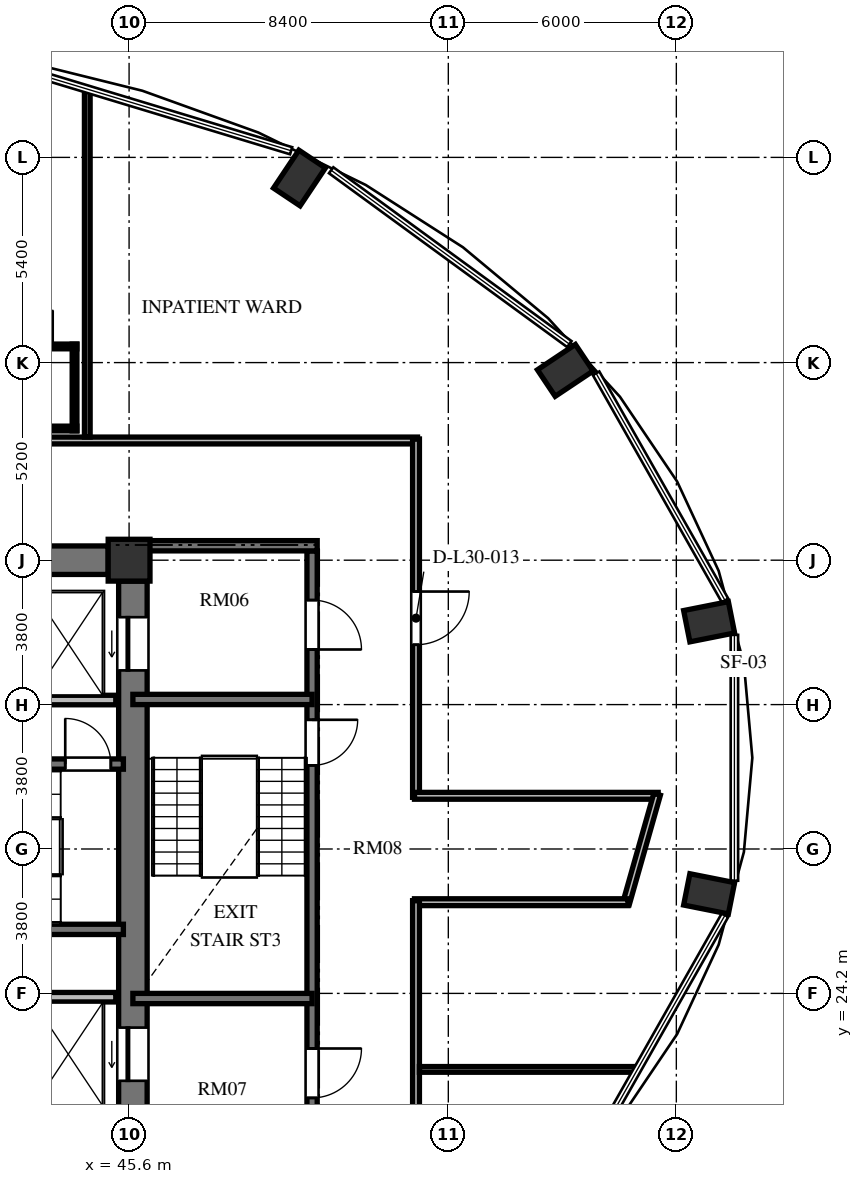
"""IFC4 building model, lengths in metres.
Left out: names, types, materials, properties, quantities, classifications, styles, units other than length and angle.
Written with IfcOpenShell. Run it as: python <this file> out.ifc"""

import sys

from ifc_helpers import new_model, si_unit, direction, frame, frame_2d, origin, origin_2d, place, context, subcontext, project, spatial, rectangle, extrude, element, fill, save


model = new_model("IFC4")
c1 = context("Model", 3, precision=1e-05, world=origin(), true_north=direction((0.0, 1.0)))
c2 = subcontext(c1, "Body", "Model", "MODEL_VIEW")
j1 = project(units=[si_unit("LENGTHUNIT", "METRE"), si_unit("PLANEANGLEUNIT", "RADIAN")], contexts=[c1])
p1 = place(None, origin())
s1 = spatial("IfcSite", under=j1, at=p1, CompositionType="ELEMENT")
p2 = place(p1, origin())
s2 = spatial("IfcBuilding", under=s1, at=p2, CompositionType="ELEMENT")
p3 = place(p2, frame((0.0, 0.0, 118.224)))
s3 = spatial("IfcBuildingStorey", under=s2, at=p3, CompositionType="ELEMENT", Elevation=118.224)
for number, where, z_axis, x_axis in (
    (1, (60.863, 26.82, 0.0), (0.0, 0.0, 1.0), (0.981, -0.195, 0.0)),
    (2, (60.863, 33.98, 0.0), (0.0, 0.0, 1.0), (0.981, 0.195, 0.0)),
    (3, (57.078, 40.595, 0.0), (0.0, 0.0, 1.0), (0.831, 0.556, 0.0)),
    (4, (50.084, 45.657, 0.0), (0.0, 0.0, 1.0), (0.556, 0.831, 0.0)),
):
    element("IfcColumn", number, at=place(p3, frame(where, z_axis=z_axis, x_axis=x_axis)), inside=s3, PredefinedType="COLUMN", context=c2, shape_type="SweptSolid", body=[
        extrude(rectangle(XDim=1.2, YDim=0.84, at=origin_2d()), origin(), (0.0, 0.0, 1.0), 3.648),
    ])
p4 = place(p3, frame((45.6, 35.6, 0.0), z_axis=(0.0, 0.0, 1.0), x_axis=(1.0, 0.0, 0.0)))
e5 = element("IfcColumn", 5, at=p4, inside=s3, PredefinedType="COLUMN", context=c2, shape_type="SweptSolid", body=[
    extrude(rectangle(XDim=1.1, YDim=1.1, at=origin_2d()), origin(), (0.0, 0.0, 1.0), 3.648),
])
p5 = place(p3, frame((45.7, 20.95, 0.0), z_axis=(0.0, 0.0, 1.0), x_axis=(0.0, 1.0, 0.0)))
e6 = element("IfcWall", 6, at=p5, inside=s3, PredefinedType="SHEAR", context=c2, shape_type="SweptSolid", body=[
    extrude(rectangle(XDim=14.1, YDim=0.75, at=frame_2d((7.05, 0.0))), origin(), (0.0, 0.0, 1.0), 3.648),
])
p6 = place(p5, frame((11.75, 0.0, 0.0)))
e7 = element("IfcOpeningElement", 7, at=p6, cuts=e6, PredefinedType="OPENING", context=c2, shape_type="SweptSolid", body=[
    extrude(rectangle(XDim=1.4, YDim=2.3, at=frame_2d((0.7, 1.15))), frame((0.0, 0.385, 0.0), z_axis=(0.0, -1.0, 0.0), x_axis=(1.0, 0.0, 0.0)), (0.0, 0.0, 1.0), 0.77),
])
p7 = place(p5, frame((0.95, 0.0, 0.0)))
e8 = element("IfcOpeningElement", 8, at=p7, cuts=e6, PredefinedType="OPENING", context=c2, shape_type="SweptSolid", body=[
    extrude(rectangle(XDim=1.4, YDim=2.3, at=frame_2d((0.7, 1.15))), frame((0.0, 0.385, 0.0), z_axis=(0.0, -1.0, 0.0), x_axis=(1.0, 0.0, 0.0)), (0.0, 0.0, 1.0), 0.77),
])
p8 = place(p3, frame((39.675, 35.6, 0.0), z_axis=(0.0, 0.0, 1.0), x_axis=(1.0, 0.0, 0.0)))
e9 = element("IfcWall", 9, at=p8, inside=s3, PredefinedType="SHEAR", context=c2, shape_type="SweptSolid", body=[
    extrude(rectangle(XDim=5.375, YDim=0.75, at=frame_2d((2.688, 0.0))), origin(), (0.0, 0.0, 1.0), 3.648),
])
p9 = place(p3, frame((37.465, 30.235, 0.0), z_axis=(0.0, 0.0, 1.0), x_axis=(1.0, 0.0, 0.0)))
e10 = element("IfcWall", 10, at=p9, inside=s3, PredefinedType="SHEAR", context=c2, shape_type="SweptSolid", body=[
    extrude(rectangle(XDim=7.985, YDim=0.27, at=frame_2d((3.992, 0.0))), origin(), (0.0, 0.0, 1.0), 3.648),
])
p10 = place(p9, frame((6.455, 0.0, 0.0)))
e11 = element("IfcOpeningElement", 11, at=p10, cuts=e10, PredefinedType="OPENING", context=c2, shape_type="SweptSolid", body=[
    extrude(rectangle(XDim=1.2, YDim=2.15, at=frame_2d((0.6, 1.075))), frame((0.0, 0.145, 0.0), z_axis=(0.0, -1.0, 0.0), x_axis=(1.0, 0.0, 0.0)), (0.0, 0.0, 1.0), 0.29),
])
p11 = place(p3, frame((37.465, 25.885, 0.0), z_axis=(0.0, 0.0, 1.0), x_axis=(1.0, 0.0, 0.0)))
e12 = element("IfcWall", 12, at=p11, inside=s3, PredefinedType="SHEAR", context=c2, shape_type="SweptSolid", body=[
    extrude(rectangle(XDim=7.985, YDim=0.27, at=frame_2d((3.992, 0.0))), origin(), (0.0, 0.0, 1.0), 3.648),
])
for number, where, z_axis, x_axis in (
    (13, (42.95, 31.92, 0.0), (0.0, 0.0, 1.0), (1.0, 0.0, 0.0)),
    (14, (42.95, 24.1, 0.0), (0.0, 0.0, 1.0), (1.0, 0.0, 0.0)),
):
    element("IfcWall", number, at=place(p3, frame(where, z_axis=z_axis, x_axis=x_axis)), inside=s3, PredefinedType="SOLIDWALL", context=c2, shape_type="SweptSolid", body=[
        extrude(rectangle(XDim=2.3, YDim=0.25, at=frame_2d((1.15, 0.0))), origin(), (0.0, 0.0, 1.0), 3.428),
    ])
p12 = place(p3, frame((50.415, 35.845, 0.0), z_axis=(0.0, 0.0, 1.0), x_axis=(0.0, -1.0, 0.0)))
e15 = element("IfcWall", 15, at=p12, inside=s3, PredefinedType="SHEAR", context=c2, shape_type="SweptSolid", body=[
    extrude(rectangle(XDim=15.825, YDim=0.27, at=frame_2d((7.913, 0.0))), origin(), (0.0, 0.0, 1.0), 3.648),
])
p13 = place(p12, frame((4.445, 0.0, 0.0)))
e16 = element("IfcOpeningElement", 16, at=p13, cuts=e15, PredefinedType="OPENING", context=c2, shape_type="SweptSolid", body=[
    extrude(rectangle(XDim=1.2, YDim=2.15, at=frame_2d((0.6, 1.075))), frame((0.0, 0.145, 0.0), z_axis=(0.0, -1.0, 0.0), x_axis=(1.0, 0.0, 0.0)), (0.0, 0.0, 1.0), 0.29),
])
p14 = place(p12, frame((1.295, 0.0, 0.0)))
e17 = element("IfcOpeningElement", 17, at=p14, cuts=e15, PredefinedType="OPENING", context=c2, shape_type="SweptSolid", body=[
    extrude(rectangle(XDim=1.3, YDim=2.2, at=frame_2d((0.65, 1.1))), frame((0.0, 0.145, 0.0), z_axis=(0.0, -1.0, 0.0), x_axis=(1.0, 0.0, 0.0)), (0.0, 0.0, 1.0), 0.29),
])
p15 = place(p12, frame((13.095, 0.0, 0.0)))
e18 = element("IfcOpeningElement", 18, at=p15, cuts=e15, PredefinedType="OPENING", context=c2, shape_type="SweptSolid", body=[
    extrude(rectangle(XDim=1.3, YDim=2.2, at=frame_2d((0.65, 1.1))), frame((0.0, 0.145, 0.0), z_axis=(0.0, -1.0, 0.0), x_axis=(1.0, 0.0, 0.0)), (0.0, 0.0, 1.0), 0.29),
])
p16 = place(p3, frame((46.075, 35.98, 0.0), z_axis=(0.0, 0.0, 1.0), x_axis=(1.0, 0.0, 0.0)))
e19 = element("IfcWall", 19, at=p16, inside=s3, PredefinedType="SHEAR", context=c2, shape_type="SweptSolid", body=[
    extrude(rectangle(XDim=4.475, YDim=0.27, at=frame_2d((2.238, 0.0))), origin(), (0.0, 0.0, 1.0), 3.648),
])
for number, where, z_axis, x_axis in (
    (20, (45.7, 31.935, 0.0), (0.0, 0.0, 1.0), (1.0, 0.0, 0.0)),
    (21, (45.7, 24.065, 0.0), (0.0, 0.0, 1.0), (1.0, 0.0, 0.0)),
):
    element("IfcWall", number, at=place(p3, frame(where, z_axis=z_axis, x_axis=x_axis)), inside=s3, PredefinedType="SHEAR", context=c2, shape_type="SweptSolid", body=[
        extrude(rectangle(XDim=4.715, YDim=0.27, at=frame_2d((2.357, 0.0))), origin(), (0.0, 0.0, 1.0), 3.648),
    ])
p17 = place(p3, frame((23.287, 38.75, 0.0), z_axis=(0.0, 0.0, 1.0), x_axis=(1.0, 0.0, 0.0)))
e22 = element("IfcWall", 22, at=p17, inside=s3, PredefinedType="PARTITIONING", context=c2, shape_type="SweptSolid", body=[
    extrude(rectangle(XDim=29.903, YDim=0.18, at=frame_2d((14.952, 0.0))), origin(), (0.0, 0.0, 1.0), 3.053),
])
p18 = place(p17, frame((12.615, 0.0, 0.0)))
e23 = element("IfcOpeningElement", 23, at=p18, cuts=e22, PredefinedType="OPENING", context=c2, shape_type="SweptSolid", body=[
    extrude(rectangle(XDim=1.4, YDim=2.2, at=frame_2d((0.7, 1.1))), frame((0.0, 0.1, 0.0), z_axis=(0.0, -1.0, 0.0), x_axis=(1.0, 0.0, 0.0)), (0.0, 0.0, 1.0), 0.2),
])
p19 = place(p17, frame((3.567, 0.0, 0.0)))
e24 = element("IfcOpeningElement", 24, at=p19, cuts=e22, PredefinedType="OPENING", context=c2, shape_type="SweptSolid", body=[
    extrude(rectangle(XDim=1.4, YDim=2.2, at=frame_2d((0.7, 1.1))), frame((0.0, 0.1, 0.0), z_axis=(0.0, -1.0, 0.0), x_axis=(1.0, 0.0, 0.0)), (0.0, 0.0, 1.0), 0.2),
])
p20 = place(p3, frame((53.15, 38.79, 0.0), z_axis=(0.0, 0.0, 1.0), x_axis=(0.0, -1.0, 0.0)))
e25 = element("IfcWall", 25, at=p20, inside=s3, PredefinedType="PARTITIONING", context=c2, shape_type="SweptSolid", body=[
    extrude(rectangle(XDim=9.43, YDim=0.18, at=frame_2d((4.715, 0.0))), origin(), (0.0, 0.0, 1.0), 3.428),
])
p21 = place(p20, frame((4.015, 0.0, 0.0)))
e26 = element("IfcOpeningElement", 26, at=p21, cuts=e25, PredefinedType="OPENING", context=c2, shape_type="SweptSolid", body=[
    extrude(rectangle(XDim=1.4, YDim=2.2, at=frame_2d((0.7, 1.1))), frame((0.0, 0.1, 0.0), z_axis=(0.0, -1.0, 0.0), x_axis=(1.0, 0.0, 0.0)), (0.0, 0.0, 1.0), 0.2),
])
p22 = place(p3, frame((53.11, 29.4, 0.0), z_axis=(0.0, 0.0, 1.0), x_axis=(1.0, 0.0, 0.0)))
e27 = element("IfcWall", 27, at=p22, inside=s3, PredefinedType="PARTITIONING", context=c2, shape_type="SweptSolid", body=[
    extrude(rectangle(XDim=6.413, YDim=0.18, at=frame_2d((3.206, 0.0))), origin(), (0.0, 0.0, 1.0), 3.428),
])
p23 = place(p3, frame((59.494, 29.438, 0.0), z_axis=(0.0, 0.0, 1.0), x_axis=(-0.273222154729, -0.961950962453, 0.0)))
e28 = element("IfcWall", 28, at=p23, inside=s3, PredefinedType="PARTITIONING", context=c2, shape_type="SweptSolid", body=[
    extrude(rectangle(XDim=2.991, YDim=0.18, at=frame_2d((1.495, 0.0))), origin(), (0.0, 0.0, 1.0), 3.428),
])
p24 = place(p3, frame((58.727, 26.6, 0.0), z_axis=(0.0, 0.0, 1.0), x_axis=(-1.0, 0.0, 0.0)))
e29 = element("IfcWall", 29, at=p24, inside=s3, PredefinedType="PARTITIONING", context=c2, shape_type="SweptSolid", body=[
    extrude(rectangle(XDim=5.617, YDim=0.18, at=frame_2d((2.809, 0.0))), origin(), (0.0, 0.0, 1.0), 3.428),
])
p25 = place(p3, frame((53.15, 26.64, 0.0), z_axis=(0.0, 0.0, 1.0), x_axis=(0.0, -1.0, 0.0)))
e30 = element("IfcWall", 30, at=p25, inside=s3, PredefinedType="PARTITIONING", context=c2, shape_type="SweptSolid", body=[
    extrude(rectangle(XDim=6.66, YDim=0.18, at=frame_2d((3.33, 0.0))), origin(), (0.0, 0.0, 1.0), 3.428),
])
p26 = place(p3, frame((53.24, 22.2, 0.0), z_axis=(0.0, 0.0, 1.0), x_axis=(1.0, 0.0, 0.0)))
e31 = element("IfcWall", 31, at=p26, inside=s3, PredefinedType="PARTITIONING", context=c2, shape_type="SweptSolid", body=[
    extrude(rectangle(XDim=5.731, YDim=0.15, at=frame_2d((2.866, 0.0))), origin(), (0.0, 0.0, 1.0), 3.428),
])
p27 = place(p3, frame((44.5, 38.84, 0.0), z_axis=(0.0, 0.0, 1.0), x_axis=(0.0, 1.0, 0.0)))
e32 = element("IfcWall", 32, at=p27, inside=s3, PredefinedType="PARTITIONING", context=c2, shape_type="SweptSolid", body=[
    extrude(rectangle(XDim=9.143, YDim=0.15, at=frame_2d((4.571, 0.0))), origin(), (0.0, 0.0, 1.0), 3.428),
])
p28 = place(p3, frame((42.005, 41.225, 0.0), z_axis=(0.0, 0.0, 1.0), x_axis=(1.0, 0.0, 0.0)))
e33 = element("IfcWall", 33, at=p28, inside=s3, PredefinedType="PARTITIONING", context=c2, shape_type="SweptSolid", body=[
    extrude(rectangle(XDim=2.22, YDim=0.125, at=frame_2d((1.11, 0.0))), origin(), (0.0, 0.0, 1.0), 3.428),
])
p29 = place(p28, frame((0.635, 0.0, 0.0)))
e34 = element("IfcOpeningElement", 34, at=p29, cuts=e33, PredefinedType="OPENING", context=c2, shape_type="SweptSolid", body=[
    extrude(rectangle(XDim=0.95, YDim=2.1, at=frame_2d((0.475, 1.05))), frame((0.0, 0.073, 0.0), z_axis=(0.0, -1.0, 0.0), x_axis=(1.0, 0.0, 0.0)), (0.0, 0.0, 1.0), 0.145),
])
p30 = place(p3, frame((42.005, 39.065, 0.0), z_axis=(0.0, 0.0, 1.0), x_axis=(1.0, 0.0, 0.0)))
e35 = element("IfcWall", 35, at=p30, inside=s3, PredefinedType="PARTITIONING", context=c2, shape_type="SweptSolid", body=[
    extrude(rectangle(XDim=2.22, YDim=0.125, at=frame_2d((1.11, 0.0))), origin(), (0.0, 0.0, 1.0), 3.428),
])
p31 = place(p3, frame((44.165, 39.005, 0.0), z_axis=(0.0, 0.0, 1.0), x_axis=(0.0, 1.0, 0.0)))
e36 = element("IfcWall", 36, at=p31, inside=s3, PredefinedType="PARTITIONING", context=c2, shape_type="SweptSolid", body=[
    extrude(rectangle(XDim=2.28, YDim=0.125, at=frame_2d((1.14, 0.0))), origin(), (0.0, 0.0, 1.0), 3.428),
])
p32 = place(p10, origin())
e37 = element("IfcDoor", 37, at=p32, inside=s3, OperationType="SINGLE_SWING_LEFT", PredefinedType="DOOR", context=c2, shape_type="SweptSolid", body=[
    extrude(rectangle(XDim=1.2, YDim=2.15, at=frame_2d((0.6, 1.075))), frame((0.0, 0.025, 0.0), z_axis=(0.0, -1.0, 0.0), x_axis=(1.0, 0.0, 0.0)), (0.0, 0.0, 1.0), 0.05),
])
fill(e11, e37)
p33 = place(p6, origin())
e38 = element("IfcDoor", 38, at=p33, inside=s3, OperationType="SLIDING_TO_LEFT", PredefinedType="DOOR", context=c2, shape_type="SweptSolid", body=[
    extrude(rectangle(XDim=1.4, YDim=2.3, at=frame_2d((0.7, 1.15))), frame((0.0, 0.025, 0.0), z_axis=(0.0, -1.0, 0.0), x_axis=(1.0, 0.0, 0.0)), (0.0, 0.0, 1.0), 0.05),
])
fill(e7, e38)
p34 = place(p7, origin())
e39 = element("IfcDoor", 39, at=p34, inside=s3, OperationType="SLIDING_TO_LEFT", PredefinedType="DOOR", context=c2, shape_type="SweptSolid", body=[
    extrude(rectangle(XDim=1.4, YDim=2.3, at=frame_2d((0.7, 1.15))), frame((0.0, 0.025, 0.0), z_axis=(0.0, -1.0, 0.0), x_axis=(1.0, 0.0, 0.0)), (0.0, 0.0, 1.0), 0.05),
])
fill(e8, e39)
p35 = place(p13, origin())
e40 = element("IfcDoor", 40, at=p35, inside=s3, OperationType="SINGLE_SWING_LEFT", PredefinedType="DOOR", context=c2, shape_type="SweptSolid", body=[
    extrude(rectangle(XDim=1.2, YDim=2.15, at=frame_2d((0.6, 1.075))), frame((0.0, 0.025, 0.0), z_axis=(0.0, -1.0, 0.0), x_axis=(1.0, 0.0, 0.0)), (0.0, 0.0, 1.0), 0.05),
])
fill(e16, e40)
p36 = place(p14, origin())
e41 = element("IfcDoor", 41, at=p36, inside=s3, OperationType="SINGLE_SWING_RIGHT", PredefinedType="DOOR", context=c2, shape_type="SweptSolid", body=[
    extrude(rectangle(XDim=1.3, YDim=2.2, at=frame_2d((0.65, 1.1))), frame((0.0, 0.025, 0.0), z_axis=(0.0, -1.0, 0.0), x_axis=(1.0, 0.0, 0.0)), (0.0, 0.0, 1.0), 0.05),
])
fill(e17, e41)
p37 = place(p15, origin())
e42 = element("IfcDoor", 42, at=p37, inside=s3, OperationType="SINGLE_SWING_LEFT", PredefinedType="DOOR", context=c2, shape_type="SweptSolid", body=[
    extrude(rectangle(XDim=1.3, YDim=2.2, at=frame_2d((0.65, 1.1))), frame((0.0, 0.025, 0.0), z_axis=(0.0, -1.0, 0.0), x_axis=(1.0, 0.0, 0.0)), (0.0, 0.0, 1.0), 0.05),
])
fill(e18, e42)
p38 = place(p21, origin())
e43 = element("IfcDoor", 43, at=p38, inside=s3, OperationType="SINGLE_SWING_LEFT", PredefinedType="DOOR", context=c2, shape_type="SweptSolid", body=[
    extrude(rectangle(XDim=1.4, YDim=2.2, at=frame_2d((0.7, 1.1))), frame((0.0, 0.025, 0.0), z_axis=(0.0, -1.0, 0.0), x_axis=(1.0, 0.0, 0.0)), (0.0, 0.0, 1.0), 0.05),
])
fill(e26, e43)
p39 = place(p29, origin())
e44 = element("IfcDoor", 44, at=p39, inside=s3, OperationType="SINGLE_SWING_RIGHT", PredefinedType="DOOR", context=c2, shape_type="SweptSolid", body=[
    extrude(rectangle(XDim=0.95, YDim=2.1, at=frame_2d((0.475, 1.05))), frame((0.0, 0.025, 0.0), z_axis=(0.0, -1.0, 0.0), x_axis=(1.0, 0.0, 0.0)), (0.0, 0.0, 1.0), 0.05),
])
fill(e34, e44)
save(model, sys.argv[1])
